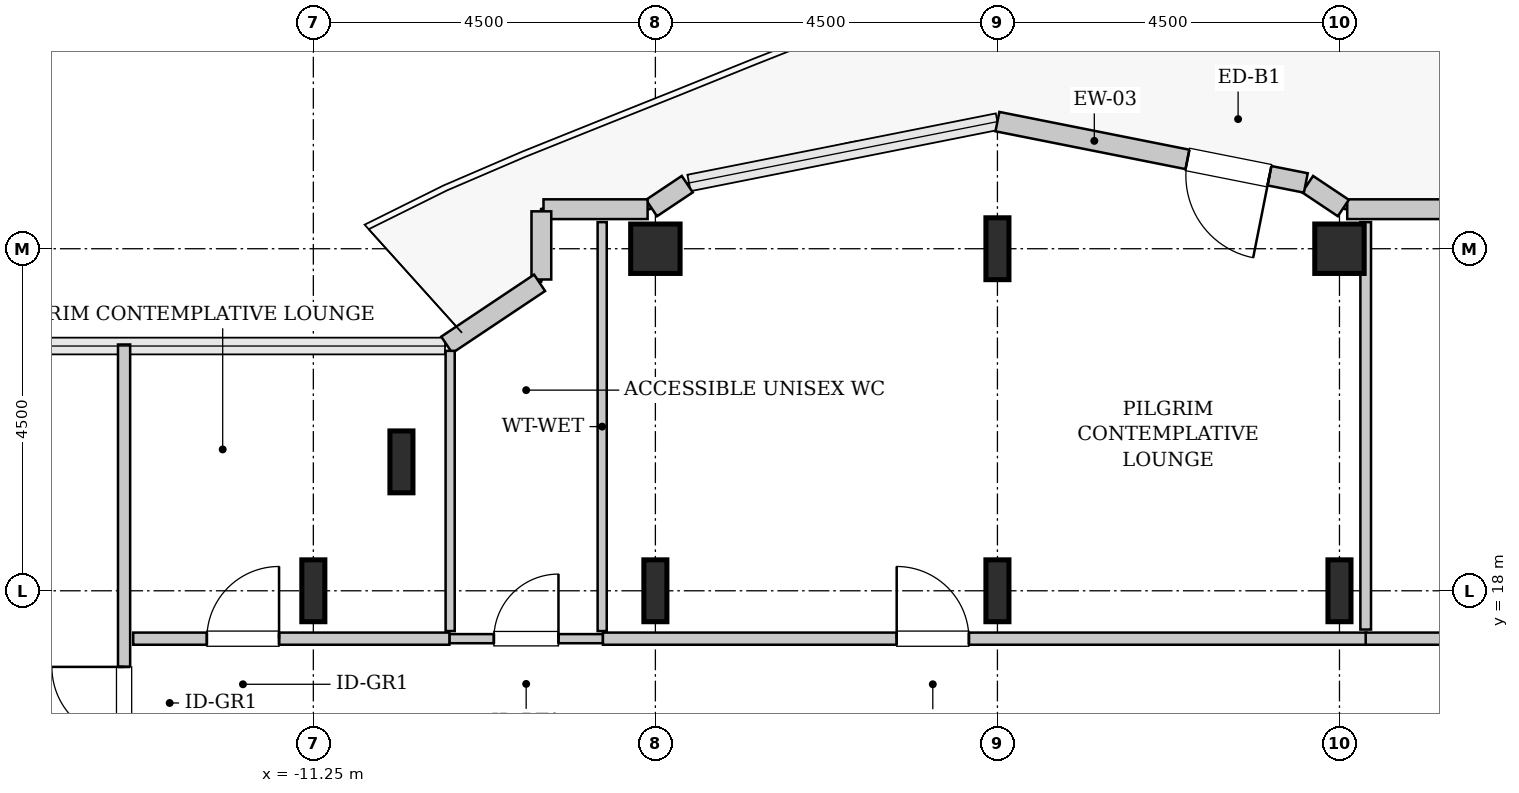
"""IFC4 building model, lengths in metres.
Left out: names, types, materials, properties, quantities, classifications, styles, units other than length and angle.
Written with IfcOpenShell. Run it as: python <this file> out.ifc"""

import sys

from ifc_helpers import new_model, si_unit, direction, frame, frame_2d, origin, origin_2d, place, context, subcontext, project, spatial, rectangle, hollow_rectangle, i_section, extrude, source, transform, mapped, element, fill, save


model = new_model("IFC4")
c1 = context("Model", 3, precision=1e-05, world=origin(), true_north=direction((0.0, 1.0)))
c2 = subcontext(c1, "Body", "Model", "MODEL_VIEW")
j1 = project(units=[si_unit("LENGTHUNIT", "METRE"), si_unit("PLANEANGLEUNIT", "RADIAN")], contexts=[c1])
p1 = place(None, origin())
s1 = spatial("IfcSite", under=j1, at=p1, CompositionType="ELEMENT")
p2 = place(p1, origin())
s2 = spatial("IfcBuilding", under=s1, at=p2, CompositionType="ELEMENT")
p3 = place(p2, frame((0.0, 0.0, 210.4)))
s3 = spatial("IfcBuildingStorey", under=s2, at=p3, CompositionType="ELEMENT", Elevation=210.4)
m1 = source(origin(), c2, "Body", "SweptSolid", [
    extrude(i_section(OverallWidth=0.303, OverallDepth=0.814, WebThickness=0.021, FlangeThickness=0.04, FilletRadius=0.03, at=origin_2d()), origin(), (0.0, 0.0, 1.0), 3.8),
])
for number, where, z_axis, x_axis in (
    (1, (-11.25, 18.0, 0.0), (0.0, 0.0, 1.0), (1.0, 0.0, 0.0)),
    (2, (-10.091, 19.696, 0.0), (0.0, 0.0, 1.0), (1.0, 0.0, 0.0)),
    (3, (-6.75, 18.0, 0.0), (0.0, 0.0, 1.0), (1.0, 0.0, 0.0)),
):
    element("IfcColumn", number, at=place(p3, frame(where, z_axis=z_axis, x_axis=x_axis)), inside=s3, PredefinedType="COLUMN", context=c2, shape_type="MappedRepresentation", body=[
        mapped(m1, transform((0.0, 0.0, 0.0), x_axis=(1.0, 0.0, 0.0), y_axis=(0.0, 1.0, 0.0), z_axis=(0.0, 0.0, 1.0), scale=1.0)),
    ])
m2 = source(origin(), c2, "Body", "SweptSolid", [
    extrude(hollow_rectangle(XDim=0.65, YDim=0.65, WallThickness=0.032, InnerFilletRadius=0.032, OuterFilletRadius=0.064, at=origin_2d()), origin(), (0.0, 0.0, 1.0), 3.8),
])
p4 = place(p3, frame((-6.75, 22.5, 0.0), z_axis=(0.0, 0.0, 1.0), x_axis=(1.0, 0.0, 0.0)))
e4 = element("IfcColumn", 4, at=p4, inside=s3, PredefinedType="COLUMN", context=c2, shape_type="MappedRepresentation", body=[
    mapped(m2, transform((0.0, 0.0, 0.0), x_axis=(1.0, 0.0, 0.0), y_axis=(0.0, 1.0, 0.0), z_axis=(0.0, 0.0, 1.0), scale=1.0)),
])
for number, where, z_axis, x_axis in (
    (5, (-2.25, 18.0, 0.0), (0.0, 0.0, 1.0), (1.0, 0.0, 0.0)),
    (6, (-2.25, 22.5, 0.0), (0.0, 0.0, 1.0), (1.0, 0.0, 0.0)),
    (7, (2.25, 18.0, 0.0), (0.0, 0.0, 1.0), (1.0, 0.0, 0.0)),
):
    element("IfcColumn", number, at=place(p3, frame(where, z_axis=z_axis, x_axis=x_axis)), inside=s3, PredefinedType="COLUMN", context=c2, shape_type="MappedRepresentation", body=[
        mapped(m1, transform((0.0, 0.0, 0.0), x_axis=(1.0, 0.0, 0.0), y_axis=(0.0, 1.0, 0.0), z_axis=(0.0, 0.0, 1.0), scale=1.0)),
    ])
p5 = place(p3, frame((2.25, 22.5, 0.0), z_axis=(0.0, 0.0, 1.0), x_axis=(1.0, 0.0, 0.0)))
e8 = element("IfcColumn", 8, at=p5, inside=s3, PredefinedType="COLUMN", context=c2, shape_type="MappedRepresentation", body=[
    mapped(m2, transform((0.0, 0.0, 0.0), x_axis=(1.0, 0.0, 0.0), y_axis=(0.0, 1.0, 0.0), z_axis=(0.0, 0.0, 1.0), scale=1.0)),
])
m3 = source(origin(), c2, "Body", "SweptSolid", [
    extrude(rectangle(XDim=1.37, YDim=0.26, at=frame_2d((0.685, 0.0))), origin(), (0.0, 0.0, 1.0), 3.55),
])
p6 = place(p3, frame((3.722, 23.02, 0.0), z_axis=(0.0, 0.0, 1.0), x_axis=(-1.0, 0.0, 0.0)))
e9 = element("IfcWall", 9, at=p6, inside=s3, PredefinedType="SOLIDWALL", context=c2, shape_type="MappedRepresentation", body=[
    mapped(m3, transform((0.0, 0.0, 0.0), x_axis=(1.0, 0.0, 0.0), y_axis=(0.0, 1.0, 0.0), z_axis=(0.0, 0.0, 1.0), scale=1.0)),
])
m4 = source(origin(), c2, "Body", "SweptSolid", [
    extrude(rectangle(XDim=0.565, YDim=0.26, at=frame_2d((0.283, 0.0))), origin(), (0.0, 0.0, 1.0), 3.55),
])
p7 = place(p3, frame((2.301, 23.036, 0.0), z_axis=(0.0, 0.0, 1.0), x_axis=(-0.831651492666, 0.555297933317, 0.0)))
e10 = element("IfcWall", 10, at=p7, inside=s3, PredefinedType="SOLIDWALL", context=c2, shape_type="MappedRepresentation", body=[
    mapped(m4, transform((0.0, 0.0, 0.0), x_axis=(1.0, 0.0, 0.0), y_axis=(0.0, 1.0, 0.0), z_axis=(0.0, 0.0, 1.0), scale=1.0)),
])
m5 = source(origin(), c2, "Body", "SweptSolid", [
    extrude(rectangle(XDim=4.137, YDim=0.26, at=frame_2d((2.068, 0.0))), origin(), (0.0, 0.0, 1.0), 3.55),
])
p8 = place(p3, frame((1.807, 23.365, 0.0), z_axis=(0.0, 0.0, 1.0), x_axis=(-0.980782170794, 0.195105954428, 0.0)))
e11 = element("IfcWall", 11, at=p8, inside=s3, PredefinedType="SOLIDWALL", context=c2, shape_type="MappedRepresentation", body=[
    mapped(m5, transform((0.0, 0.0, 0.0), x_axis=(1.0, 0.0, 0.0), y_axis=(0.0, 1.0, 0.0), z_axis=(0.0, 0.0, 1.0), scale=1.0)),
])
p9 = place(p8, frame((0.488, 0.0, 0.0)))
e12 = element("IfcOpeningElement", 12, at=p9, cuts=e11, PredefinedType="OPENING", context=c2, shape_type="SweptSolid", body=[
    extrude(rectangle(XDim=1.1, YDim=2.2, at=frame_2d((0.55, 1.1))), frame((0.0, 0.14, 0.0), z_axis=(0.0, -1.0, 0.0), x_axis=(1.0, 0.0, 0.0)), (0.0, 0.0, 1.0), 0.28),
])
p10 = place(p3, frame((-6.331, 23.35, 0.0), z_axis=(0.0, 0.0, 1.0), x_axis=(-0.831651492666, -0.555297933317, 0.0)))
e13 = element("IfcWall", 13, at=p10, inside=s3, PredefinedType="SOLIDWALL", context=c2, shape_type="MappedRepresentation", body=[
    mapped(m4, transform((0.0, 0.0, 0.0), x_axis=(1.0, 0.0, 0.0), y_axis=(0.0, 1.0, 0.0), z_axis=(0.0, 0.0, 1.0), scale=1.0)),
])
p11 = place(p3, frame((-6.852, 23.02, 0.0), z_axis=(0.0, 0.0, 1.0), x_axis=(-1.0, 0.0, 0.0)))
e14 = element("IfcWall", 14, at=p11, inside=s3, PredefinedType="SOLIDWALL", context=c2, shape_type="MappedRepresentation", body=[
    mapped(m3, transform((0.0, 0.0, 0.0), x_axis=(1.0, 0.0, 0.0), y_axis=(0.0, 1.0, 0.0), z_axis=(0.0, 0.0, 1.0), scale=1.0)),
])
m6 = source(origin(), c2, "Body", "SweptSolid", [
    extrude(rectangle(XDim=0.897, YDim=0.26, at=frame_2d((0.448, 0.0))), origin(), (0.0, 0.0, 1.0), 3.55),
])
p12 = place(p3, frame((-8.25, 22.992, 0.0), z_axis=(0.0, 0.0, 1.0), x_axis=(0.0, -1.0, 0.0)))
e15 = element("IfcWall", 15, at=p12, inside=s3, PredefinedType="SOLIDWALL", context=c2, shape_type="MappedRepresentation", body=[
    mapped(m6, transform((0.0, 0.0, 0.0), x_axis=(1.0, 0.0, 0.0), y_axis=(0.0, 1.0, 0.0), z_axis=(0.0, 0.0, 1.0), scale=1.0)),
])
m7 = source(origin(), c2, "Body", "SweptSolid", [
    extrude(rectangle(XDim=1.469, YDim=0.26, at=frame_2d((0.734, 0.0))), origin(), (0.0, 0.0, 1.0), 3.55),
])
p13 = place(p3, frame((-8.273, 22.052, 0.0), z_axis=(0.0, 0.0, 1.0), x_axis=(-0.831461760506, -0.555581983884, 0.0)))
e16 = element("IfcWall", 16, at=p13, inside=s3, PredefinedType="SOLIDWALL", context=c2, shape_type="MappedRepresentation", body=[
    mapped(m7, transform((0.0, 0.0, 0.0), x_axis=(1.0, 0.0, 0.0), y_axis=(0.0, 1.0, 0.0), z_axis=(0.0, 0.0, 1.0), scale=1.0)),
])
m8 = source(origin(), c2, "Body", "SweptSolid", [
    extrude(rectangle(XDim=2.02, YDim=0.12, at=frame_2d((1.01, 0.0))), origin(), (0.0, 0.0, 1.0), 3.535),
])
p14 = place(p3, frame((-9.46, 17.37, 0.0), z_axis=(0.0, 0.0, 1.0), x_axis=(1.0, 0.0, 0.0)))
e17 = element("IfcWall", 17, at=p14, inside=s3, PredefinedType="PLUMBINGWALL", context=c2, shape_type="MappedRepresentation", body=[
    mapped(m8, transform((0.0, 0.0, 0.0), x_axis=(1.0, 0.0, 0.0), y_axis=(0.0, 1.0, 0.0), z_axis=(0.0, 0.0, 1.0), scale=1.0)),
])
p15 = place(p14, frame((0.585, 0.0, 0.0)))
e18 = element("IfcOpeningElement", 18, at=p15, cuts=e17, PredefinedType="OPENING", context=c2, shape_type="SweptSolid", body=[
    extrude(rectangle(XDim=0.85, YDim=2.1, at=frame_2d((0.425, 1.05))), frame((0.0, 0.07, 0.0), z_axis=(0.0, -1.0, 0.0), x_axis=(1.0, 0.0, 0.0)), (0.0, 0.0, 1.0), 0.14),
])
m9 = source(origin(), c2, "Body", "SweptSolid", [
    extrude(rectangle(XDim=5.38, YDim=0.12, at=frame_2d((2.69, 0.0))), origin(), (0.0, 0.0, 1.0), 3.535),
])
p16 = place(p3, frame((-7.45, 17.47, 0.0), z_axis=(0.0, 0.0, 1.0), x_axis=(0.0, 1.0, 0.0)))
e19 = element("IfcWall", 19, at=p16, inside=s3, PredefinedType="PLUMBINGWALL", context=c2, shape_type="MappedRepresentation", body=[
    mapped(m9, transform((0.0, 0.0, 0.0), x_axis=(1.0, 0.0, 0.0), y_axis=(0.0, 1.0, 0.0), z_axis=(0.0, 0.0, 1.0), scale=1.0)),
])
m10 = source(origin(), c2, "Body", "SweptSolid", [
    extrude(rectangle(XDim=3.687, YDim=0.12, at=frame_2d((1.843, 0.0))), origin(), (0.0, 0.0, 1.0), 3.535),
])
p17 = place(p3, frame((-9.45, 17.47, 0.0), z_axis=(0.0, 0.0, 1.0), x_axis=(0.0, 1.0, 0.0)))
e20 = element("IfcWall", 20, at=p17, inside=s3, PredefinedType="PLUMBINGWALL", context=c2, shape_type="MappedRepresentation", body=[
    mapped(m10, transform((0.0, 0.0, 0.0), x_axis=(1.0, 0.0, 0.0), y_axis=(0.0, 1.0, 0.0), z_axis=(0.0, 0.0, 1.0), scale=1.0)),
])
m11 = source(origin(), c2, "Body", "SweptSolid", [
    extrude(rectangle(XDim=5.603, YDim=0.16, at=frame_2d((2.801, 0.0))), origin(), (0.0, 0.0, 1.0), 3.535),
])
p18 = place(p3, frame((-13.74, 15.637, 0.0), z_axis=(0.0, 0.0, 1.0), x_axis=(0.0, 1.0, 0.0)))
e21 = element("IfcWall", 21, at=p18, inside=s3, PredefinedType="PARTITIONING", context=c2, shape_type="MappedRepresentation", body=[
    mapped(m11, transform((0.0, 0.0, 0.0), x_axis=(1.0, 0.0, 0.0), y_axis=(0.0, 1.0, 0.0), z_axis=(0.0, 0.0, 1.0), scale=1.0)),
])
p19 = place(p18, frame((0.411, 0.0, 0.0)))
e22 = element("IfcOpeningElement", 22, at=p19, cuts=e21, PredefinedType="OPENING", context=c2, shape_type="SweptSolid", body=[
    extrude(rectangle(XDim=0.95, YDim=2.1, at=frame_2d((0.475, 1.05))), frame((0.0, 0.09, 0.0), z_axis=(0.0, -1.0, 0.0), x_axis=(1.0, 0.0, 0.0)), (0.0, 0.0, 1.0), 0.18),
])
m12 = source(origin(), c2, "Body", "SweptSolid", [
    extrude(rectangle(XDim=10.045, YDim=0.16, at=frame_2d((5.022, 0.0))), origin(), (0.0, 0.0, 1.0), 3.535),
])
p20 = place(p3, frame((-7.44, 17.37, 0.0), z_axis=(0.0, 0.0, 1.0), x_axis=(1.0, 0.0, 0.0)))
e23 = element("IfcWall", 23, at=p20, inside=s3, PredefinedType="PARTITIONING", context=c2, shape_type="MappedRepresentation", body=[
    mapped(m12, transform((0.0, 0.0, 0.0), x_axis=(1.0, 0.0, 0.0), y_axis=(0.0, 1.0, 0.0), z_axis=(0.0, 0.0, 1.0), scale=1.0)),
])
p21 = place(p20, frame((3.865, 0.0, 0.0)))
e24 = element("IfcOpeningElement", 24, at=p21, cuts=e23, PredefinedType="OPENING", context=c2, shape_type="SweptSolid", body=[
    extrude(rectangle(XDim=0.95, YDim=2.1, at=frame_2d((0.475, 1.05))), frame((0.0, 0.09, 0.0), z_axis=(0.0, -1.0, 0.0), x_axis=(1.0, 0.0, 0.0)), (0.0, 0.0, 1.0), 0.18),
])
m13 = source(origin(), c2, "Body", "SweptSolid", [
    extrude(rectangle(XDim=5.36, YDim=0.14, at=frame_2d((2.68, 0.0))), origin(), (0.0, 0.0, 1.0), 2.925),
])
p22 = place(p3, frame((2.595, 17.49, 0.0), z_axis=(0.0, 0.0, 1.0), x_axis=(0.0, 1.0, 0.0)))
e25 = element("IfcWall", 25, at=p22, inside=s3, PredefinedType="PARTITIONING", context=c2, shape_type="MappedRepresentation", body=[
    mapped(m13, transform((0.0, 0.0, 0.0), x_axis=(1.0, 0.0, 0.0), y_axis=(0.0, 1.0, 0.0), z_axis=(0.0, 0.0, 1.0), scale=1.0)),
])
m14 = source(origin(), c2, "Body", "SweptSolid", [
    extrude(rectangle(XDim=4.16, YDim=0.16, at=frame_2d((2.08, 0.0))), origin(), (0.0, 0.0, 1.0), 3.535),
])
p23 = place(p3, frame((-13.62, 17.37, 0.0), z_axis=(0.0, 0.0, 1.0), x_axis=(1.0, 0.0, 0.0)))
e26 = element("IfcWall", 26, at=p23, inside=s3, PredefinedType="PARTITIONING", context=c2, shape_type="MappedRepresentation", body=[
    mapped(m14, transform((0.0, 0.0, 0.0), x_axis=(1.0, 0.0, 0.0), y_axis=(0.0, 1.0, 0.0), z_axis=(0.0, 0.0, 1.0), scale=1.0)),
])
p24 = place(p23, frame((0.969, 0.0, 0.0)))
e27 = element("IfcOpeningElement", 27, at=p24, cuts=e26, PredefinedType="OPENING", context=c2, shape_type="SweptSolid", body=[
    extrude(rectangle(XDim=0.95, YDim=2.1, at=frame_2d((0.475, 1.05))), frame((0.0, 0.09, 0.0), z_axis=(0.0, -1.0, 0.0), x_axis=(1.0, 0.0, 0.0)), (0.0, 0.0, 1.0), 0.18),
])
m15 = source(origin(), c2, "Body", "SweptSolid", [
    extrude(rectangle(XDim=5.61, YDim=0.16, at=frame_2d((2.805, 0.0))), origin(), (0.0, 0.0, 1.0), 3.535),
])
p25 = place(p3, frame((2.595, 17.37, 0.0), z_axis=(0.0, 0.0, 1.0), x_axis=(1.0, 0.0, 0.0)))
e28 = element("IfcWall", 28, at=p25, inside=s3, PredefinedType="PARTITIONING", context=c2, shape_type="MappedRepresentation", body=[
    mapped(m15, transform((0.0, 0.0, 0.0), x_axis=(1.0, 0.0, 0.0), y_axis=(0.0, 1.0, 0.0), z_axis=(0.0, 0.0, 1.0), scale=1.0)),
])
p26 = place(p25, frame((2.33, 0.0, 0.0)))
e29 = element("IfcOpeningElement", 29, at=p26, cuts=e28, PredefinedType="OPENING", context=c2, shape_type="SweptSolid", body=[
    extrude(rectangle(XDim=0.95, YDim=2.1, at=frame_2d((0.475, 1.05))), frame((0.0, 0.09, 0.0), z_axis=(0.0, -1.0, 0.0), x_axis=(1.0, 0.0, 0.0)), (0.0, 0.0, 1.0), 0.18),
])
m16 = source(origin(), c2, "Body", "SweptSolid", [
    extrude(rectangle(XDim=1.1, YDim=2.2, at=frame_2d((0.55, 1.1))), frame((0.0, 0.025, 0.0), z_axis=(0.0, -1.0, 0.0), x_axis=(1.0, 0.0, 0.0)), (0.0, 0.0, 1.0), 0.05),
])
p27 = place(p9, origin())
e30 = element("IfcDoor", 30, at=p27, inside=s3, OperationType="SINGLE_SWING_LEFT", PredefinedType="DOOR", context=c2, shape_type="MappedRepresentation", body=[
    mapped(m16, transform((0.0, 0.0, 0.0), x_axis=(1.0, 0.0, 0.0), y_axis=(0.0, 1.0, 0.0), z_axis=(0.0, 0.0, 1.0), scale=1.0)),
])
fill(e12, e30)
m17 = source(origin(), c2, "Body", "SweptSolid", [
    extrude(rectangle(XDim=0.85, YDim=2.1, at=frame_2d((0.425, 1.05))), frame((0.0, 0.025, 0.0), z_axis=(0.0, -1.0, 0.0), x_axis=(1.0, 0.0, 0.0)), (0.0, 0.0, 1.0), 0.05),
])
p28 = place(p15, origin())
e31 = element("IfcDoor", 31, at=p28, inside=s3, OperationType="SINGLE_SWING_RIGHT", PredefinedType="DOOR", context=c2, shape_type="MappedRepresentation", body=[
    mapped(m17, transform((0.0, 0.0, 0.0), x_axis=(1.0, 0.0, 0.0), y_axis=(0.0, 1.0, 0.0), z_axis=(0.0, 0.0, 1.0), scale=1.0)),
])
fill(e18, e31)
m18 = source(origin(), c2, "Body", "SweptSolid", [
    extrude(rectangle(XDim=0.95, YDim=2.1, at=frame_2d((0.475, 1.05))), frame((0.0, 0.025, 0.0), z_axis=(0.0, -1.0, 0.0), x_axis=(1.0, 0.0, 0.0)), (0.0, 0.0, 1.0), 0.05),
])
p29 = place(p19, origin())
e32 = element("IfcDoor", 32, at=p29, inside=s3, OperationType="SINGLE_SWING_RIGHT", PredefinedType="DOOR", context=c2, shape_type="MappedRepresentation", body=[
    mapped(m18, transform((0.0, 0.0, 0.0), x_axis=(1.0, 0.0, 0.0), y_axis=(0.0, 1.0, 0.0), z_axis=(0.0, 0.0, 1.0), scale=1.0)),
])
fill(e22, e32)
p30 = place(p21, origin())
e33 = element("IfcDoor", 33, at=p30, inside=s3, OperationType="SINGLE_SWING_LEFT", PredefinedType="DOOR", context=c2, shape_type="MappedRepresentation", body=[
    mapped(m18, transform((0.0, 0.0, 0.0), x_axis=(1.0, 0.0, 0.0), y_axis=(0.0, 1.0, 0.0), z_axis=(0.0, 0.0, 1.0), scale=1.0)),
])
fill(e24, e33)
p31 = place(p24, origin())
e34 = element("IfcDoor", 34, at=p31, inside=s3, OperationType="SINGLE_SWING_RIGHT", PredefinedType="DOOR", context=c2, shape_type="MappedRepresentation", body=[
    mapped(m18, transform((0.0, 0.0, 0.0), x_axis=(1.0, 0.0, 0.0), y_axis=(0.0, 1.0, 0.0), z_axis=(0.0, 0.0, 1.0), scale=1.0)),
])
fill(e27, e34)
save(model, sys.argv[1])
